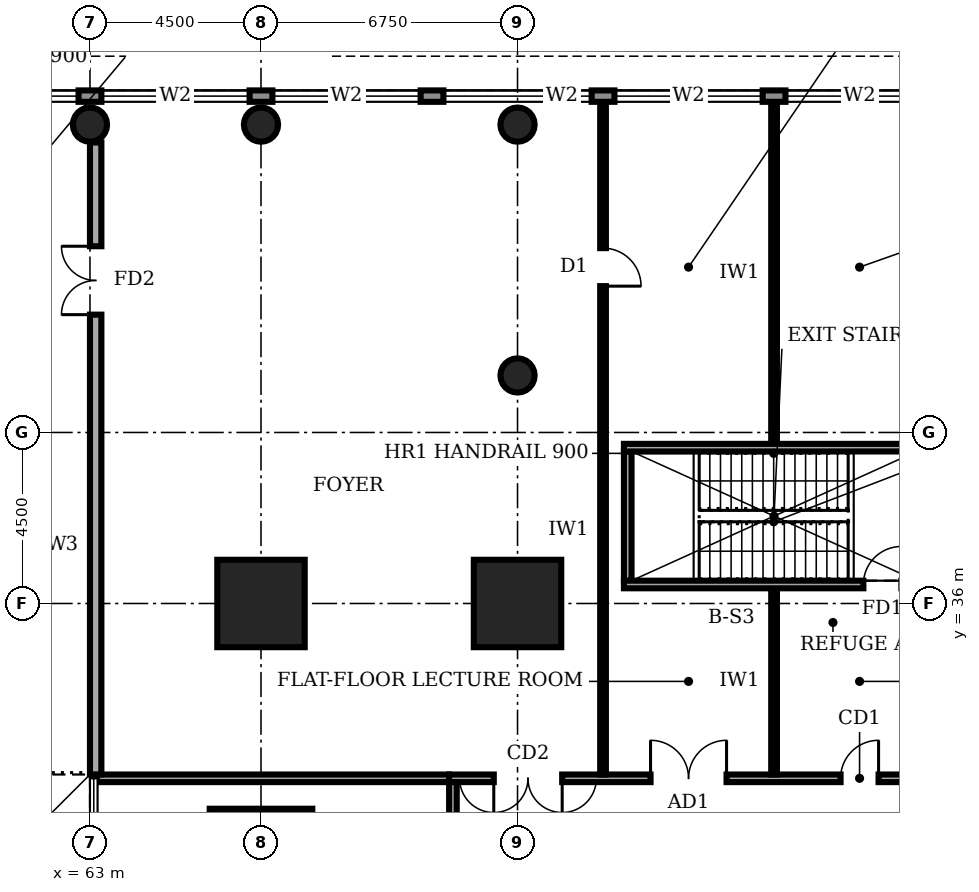
"""IFC4 building model, lengths in metres.
Left out: names, types, materials, properties, quantities, classifications, styles, units other than length and angle.
Written with IfcOpenShell. Run it as: python <this file> out.ifc"""

import sys

from ifc_helpers import new_model, si_unit, direction, frame, frame_2d, origin, origin_2d, place, context, subcontext, project, spatial, rectangle, circle, extrude, element, fill, save


model = new_model("IFC4")
c1 = context("Model", 3, precision=1e-05, world=origin(), true_north=direction((0.0, 1.0)))
c2 = subcontext(c1, "Body", "Model", "MODEL_VIEW")
j1 = project(units=[si_unit("LENGTHUNIT", "METRE"), si_unit("PLANEANGLEUNIT", "RADIAN")], contexts=[c1])
p1 = place(None, origin())
s1 = spatial("IfcSite", under=j1, at=p1, CompositionType="ELEMENT")
p2 = place(p1, origin())
s2 = spatial("IfcBuilding", under=s1, at=p2, CompositionType="ELEMENT")
p3 = place(p2, frame((0.0, 0.0, 6.0)))
s3 = spatial("IfcBuildingStorey", under=s2, at=p3, CompositionType="ELEMENT", Elevation=6.0)
p4 = place(p3, frame((67.5, 29.25, 0.0), z_axis=(0.0, 0.0, 1.0), x_axis=(1.0, 0.0, 0.0)))
e1 = element("IfcColumn", 1, at=p4, inside=s3, PredefinedType="COLUMN", context=c2, shape_type="SweptSolid", body=[
    extrude(rectangle(XDim=2.7, YDim=2.7, at=origin_2d()), origin(), (0.0, 0.0, 1.0), 5.0),
])
for number, where, z_axis, x_axis in (
    (2, (67.5, 36.0, 0.0), (0.0, 0.0, 1.0), (1.0, 0.0, 0.0)),
    (3, (74.25, 36.0, 0.0), (0.0, 0.0, 1.0), (1.0, 0.0, 0.0)),
):
    element("IfcColumn", number, at=place(p3, frame(where, z_axis=z_axis, x_axis=x_axis)), inside=s3, PredefinedType="COLUMN", context=c2, shape_type="SweptSolid", body=[
        extrude(rectangle(XDim=2.3, YDim=2.3, at=origin_2d()), origin(), (0.0, 0.0, 1.0), 5.0),
    ])
for number, where, z_axis, x_axis in (
    (4, (74.25, 42.0, 0.0), (0.0, 0.0, 1.0), (1.0, 0.0, 0.0)),
    (5, (63.0, 48.6, 0.0), (0.0, 0.0, 1.0), (1.0, 0.0, 0.0)),
    (6, (67.5, 48.6, 0.0), (0.0, 0.0, 1.0), (1.0, 0.0, 0.0)),
    (7, (74.25, 48.6, 0.0), (0.0, 0.0, 1.0), (1.0, 0.0, 0.0)),
):
    element("IfcColumn", number, at=place(p3, frame(where, z_axis=z_axis, x_axis=x_axis)), inside=s3, PredefinedType="COLUMN", context=c2, shape_type="SweptSolid", body=[
        extrude(circle(Radius=0.45, at=origin_2d()), origin(), (0.0, 0.0, 1.0), 5.0),
    ])
p5 = place(p3, frame((98.98, 49.35, 0.0), z_axis=(0.0, 0.0, 1.0), x_axis=(-1.0, 0.0, 0.0)))
e8 = element("IfcWall", 8, at=p5, inside=s3, PredefinedType="STANDARD", context=c2, shape_type="SweptSolid", body=[
    extrude(rectangle(XDim=98.96, YDim=0.3, at=frame_2d((49.48, 0.0))), origin(), (0.0, 0.0, 1.0), 4.7),
])
p6 = place(p5, frame((94.78, 0.0, 0.6)))
e9 = element("IfcOpeningElement", 9, at=p6, cuts=e8, PredefinedType="OPENING", context=c2, shape_type="SweptSolid", body=[
    extrude(rectangle(XDim=3.9, YDim=2.6, at=frame_2d((1.95, 1.3))), frame((0.0, 0.16, 0.0), z_axis=(0.0, -1.0, 0.0), x_axis=(1.0, 0.0, 0.0)), (0.0, 0.0, 1.0), 0.32),
])
p7 = place(p5, frame((90.28, 0.0, 0.6)))
e10 = element("IfcOpeningElement", 10, at=p7, cuts=e8, PredefinedType="OPENING", context=c2, shape_type="SweptSolid", body=[
    extrude(rectangle(XDim=3.9, YDim=2.6, at=frame_2d((1.95, 1.3))), frame((0.0, 0.16, 0.0), z_axis=(0.0, -1.0, 0.0), x_axis=(1.0, 0.0, 0.0)), (0.0, 0.0, 1.0), 0.32),
])
p8 = place(p5, frame((85.78, 0.0, 0.6)))
e11 = element("IfcOpeningElement", 11, at=p8, cuts=e8, PredefinedType="OPENING", context=c2, shape_type="SweptSolid", body=[
    extrude(rectangle(XDim=3.9, YDim=2.6, at=frame_2d((1.95, 1.3))), frame((0.0, 0.16, 0.0), z_axis=(0.0, -1.0, 0.0), x_axis=(1.0, 0.0, 0.0)), (0.0, 0.0, 1.0), 0.32),
])
p9 = place(p5, frame((81.28, 0.0, 0.6)))
e12 = element("IfcOpeningElement", 12, at=p9, cuts=e8, PredefinedType="OPENING", context=c2, shape_type="SweptSolid", body=[
    extrude(rectangle(XDim=3.9, YDim=2.6, at=frame_2d((1.95, 1.3))), frame((0.0, 0.16, 0.0), z_axis=(0.0, -1.0, 0.0), x_axis=(1.0, 0.0, 0.0)), (0.0, 0.0, 1.0), 0.32),
])
p10 = place(p5, frame((76.78, 0.0, 0.6)))
e13 = element("IfcOpeningElement", 13, at=p10, cuts=e8, PredefinedType="OPENING", context=c2, shape_type="SweptSolid", body=[
    extrude(rectangle(XDim=3.9, YDim=2.6, at=frame_2d((1.95, 1.3))), frame((0.0, 0.16, 0.0), z_axis=(0.0, -1.0, 0.0), x_axis=(1.0, 0.0, 0.0)), (0.0, 0.0, 1.0), 0.32),
])
p11 = place(p5, frame((72.28, 0.0, 0.6)))
e14 = element("IfcOpeningElement", 14, at=p11, cuts=e8, PredefinedType="OPENING", context=c2, shape_type="SweptSolid", body=[
    extrude(rectangle(XDim=3.9, YDim=2.6, at=frame_2d((1.95, 1.3))), frame((0.0, 0.16, 0.0), z_axis=(0.0, -1.0, 0.0), x_axis=(1.0, 0.0, 0.0)), (0.0, 0.0, 1.0), 0.32),
])
p12 = place(p5, frame((67.78, 0.0, 0.6)))
e15 = element("IfcOpeningElement", 15, at=p12, cuts=e8, PredefinedType="OPENING", context=c2, shape_type="SweptSolid", body=[
    extrude(rectangle(XDim=3.9, YDim=2.6, at=frame_2d((1.95, 1.3))), frame((0.0, 0.16, 0.0), z_axis=(0.0, -1.0, 0.0), x_axis=(1.0, 0.0, 0.0)), (0.0, 0.0, 1.0), 0.32),
])
p13 = place(p5, frame((63.28, 0.0, 0.6)))
e16 = element("IfcOpeningElement", 16, at=p13, cuts=e8, PredefinedType="OPENING", context=c2, shape_type="SweptSolid", body=[
    extrude(rectangle(XDim=3.9, YDim=2.6, at=frame_2d((1.95, 1.3))), frame((0.0, 0.16, 0.0), z_axis=(0.0, -1.0, 0.0), x_axis=(1.0, 0.0, 0.0)), (0.0, 0.0, 1.0), 0.32),
])
p14 = place(p5, frame((58.78, 0.0, 0.6)))
e17 = element("IfcOpeningElement", 17, at=p14, cuts=e8, PredefinedType="OPENING", context=c2, shape_type="SweptSolid", body=[
    extrude(rectangle(XDim=3.9, YDim=2.6, at=frame_2d((1.95, 1.3))), frame((0.0, 0.16, 0.0), z_axis=(0.0, -1.0, 0.0), x_axis=(1.0, 0.0, 0.0)), (0.0, 0.0, 1.0), 0.32),
])
p15 = place(p5, frame((54.28, 0.0, 0.6)))
e18 = element("IfcOpeningElement", 18, at=p15, cuts=e8, PredefinedType="OPENING", context=c2, shape_type="SweptSolid", body=[
    extrude(rectangle(XDim=3.9, YDim=2.6, at=frame_2d((1.95, 1.3))), frame((0.0, 0.16, 0.0), z_axis=(0.0, -1.0, 0.0), x_axis=(1.0, 0.0, 0.0)), (0.0, 0.0, 1.0), 0.32),
])
p16 = place(p5, frame((49.78, 0.0, 0.6)))
e19 = element("IfcOpeningElement", 19, at=p16, cuts=e8, PredefinedType="OPENING", context=c2, shape_type="SweptSolid", body=[
    extrude(rectangle(XDim=3.9, YDim=2.6, at=frame_2d((1.95, 1.3))), frame((0.0, 0.16, 0.0), z_axis=(0.0, -1.0, 0.0), x_axis=(1.0, 0.0, 0.0)), (0.0, 0.0, 1.0), 0.32),
])
p17 = place(p5, frame((45.28, 0.0, 0.6)))
e20 = element("IfcOpeningElement", 20, at=p17, cuts=e8, PredefinedType="OPENING", context=c2, shape_type="SweptSolid", body=[
    extrude(rectangle(XDim=3.9, YDim=2.6, at=frame_2d((1.95, 1.3))), frame((0.0, 0.16, 0.0), z_axis=(0.0, -1.0, 0.0), x_axis=(1.0, 0.0, 0.0)), (0.0, 0.0, 1.0), 0.32),
])
p18 = place(p5, frame((40.78, 0.0, 0.6)))
e21 = element("IfcOpeningElement", 21, at=p18, cuts=e8, PredefinedType="OPENING", context=c2, shape_type="SweptSolid", body=[
    extrude(rectangle(XDim=3.9, YDim=2.6, at=frame_2d((1.95, 1.3))), frame((0.0, 0.16, 0.0), z_axis=(0.0, -1.0, 0.0), x_axis=(1.0, 0.0, 0.0)), (0.0, 0.0, 1.0), 0.32),
])
p19 = place(p5, frame((36.28, 0.0, 0.6)))
e22 = element("IfcOpeningElement", 22, at=p19, cuts=e8, PredefinedType="OPENING", context=c2, shape_type="SweptSolid", body=[
    extrude(rectangle(XDim=3.9, YDim=2.6, at=frame_2d((1.95, 1.3))), frame((0.0, 0.16, 0.0), z_axis=(0.0, -1.0, 0.0), x_axis=(1.0, 0.0, 0.0)), (0.0, 0.0, 1.0), 0.32),
])
p20 = place(p5, frame((31.78, 0.0, 0.6)))
e23 = element("IfcOpeningElement", 23, at=p20, cuts=e8, PredefinedType="OPENING", context=c2, shape_type="SweptSolid", body=[
    extrude(rectangle(XDim=3.9, YDim=2.6, at=frame_2d((1.95, 1.3))), frame((0.0, 0.16, 0.0), z_axis=(0.0, -1.0, 0.0), x_axis=(1.0, 0.0, 0.0)), (0.0, 0.0, 1.0), 0.32),
])
p21 = place(p5, frame((27.28, 0.0, 0.6)))
e24 = element("IfcOpeningElement", 24, at=p21, cuts=e8, PredefinedType="OPENING", context=c2, shape_type="SweptSolid", body=[
    extrude(rectangle(XDim=3.9, YDim=2.6, at=frame_2d((1.95, 1.3))), frame((0.0, 0.16, 0.0), z_axis=(0.0, -1.0, 0.0), x_axis=(1.0, 0.0, 0.0)), (0.0, 0.0, 1.0), 0.32),
])
p22 = place(p5, frame((22.78, 0.0, 0.6)))
e25 = element("IfcOpeningElement", 25, at=p22, cuts=e8, PredefinedType="OPENING", context=c2, shape_type="SweptSolid", body=[
    extrude(rectangle(XDim=3.9, YDim=2.6, at=frame_2d((1.95, 1.3))), frame((0.0, 0.16, 0.0), z_axis=(0.0, -1.0, 0.0), x_axis=(1.0, 0.0, 0.0)), (0.0, 0.0, 1.0), 0.32),
])
p23 = place(p5, frame((18.28, 0.0, 0.6)))
e26 = element("IfcOpeningElement", 26, at=p23, cuts=e8, PredefinedType="OPENING", context=c2, shape_type="SweptSolid", body=[
    extrude(rectangle(XDim=3.9, YDim=2.6, at=frame_2d((1.95, 1.3))), frame((0.0, 0.16, 0.0), z_axis=(0.0, -1.0, 0.0), x_axis=(1.0, 0.0, 0.0)), (0.0, 0.0, 1.0), 0.32),
])
p24 = place(p5, frame((13.78, 0.0, 0.6)))
e27 = element("IfcOpeningElement", 27, at=p24, cuts=e8, PredefinedType="OPENING", context=c2, shape_type="SweptSolid", body=[
    extrude(rectangle(XDim=3.9, YDim=2.6, at=frame_2d((1.95, 1.3))), frame((0.0, 0.16, 0.0), z_axis=(0.0, -1.0, 0.0), x_axis=(1.0, 0.0, 0.0)), (0.0, 0.0, 1.0), 0.32),
])
p25 = place(p5, frame((9.28, 0.0, 0.6)))
e28 = element("IfcOpeningElement", 28, at=p25, cuts=e8, PredefinedType="OPENING", context=c2, shape_type="SweptSolid", body=[
    extrude(rectangle(XDim=3.9, YDim=2.6, at=frame_2d((1.95, 1.3))), frame((0.0, 0.16, 0.0), z_axis=(0.0, -1.0, 0.0), x_axis=(1.0, 0.0, 0.0)), (0.0, 0.0, 1.0), 0.32),
])
p26 = place(p5, frame((4.78, 0.0, 0.6)))
e29 = element("IfcOpeningElement", 29, at=p26, cuts=e8, PredefinedType="OPENING", context=c2, shape_type="SweptSolid", body=[
    extrude(rectangle(XDim=3.9, YDim=2.6, at=frame_2d((1.95, 1.3))), frame((0.0, 0.16, 0.0), z_axis=(0.0, -1.0, 0.0), x_axis=(1.0, 0.0, 0.0)), (0.0, 0.0, 1.0), 0.32),
])
p27 = place(p3, frame((89.35, 31.4, 0.0), z_axis=(0.0, 0.0, 1.0), x_axis=(-1.0, 0.0, 0.0)))
e30 = element("IfcWall", 30, at=p27, inside=s3, PredefinedType="SOLIDWALL", context=c2, shape_type="SweptSolid", body=[
    extrude(rectangle(XDim=16.9, YDim=0.2, at=frame_2d((8.45, 0.0))), origin(), (0.0, 0.0, 1.0), 4.7),
])
p28 = place(p27, frame((13.925, 0.0, 0.0)))
e31 = element("IfcOpeningElement", 31, at=p28, cuts=e30, PredefinedType="OPENING", context=c2, shape_type="SweptSolid", body=[
    extrude(rectangle(XDim=1.8, YDim=2.1, at=frame_2d((0.9, 1.05))), frame((0.0, 0.11, 0.0), z_axis=(0.0, -1.0, 0.0), x_axis=(1.0, 0.0, 0.0)), (0.0, 0.0, 1.0), 0.22),
])
p29 = place(p27, frame((9.6, 0.0, 0.0)))
e32 = element("IfcOpeningElement", 32, at=p29, cuts=e30, PredefinedType="OPENING", context=c2, shape_type="SweptSolid", body=[
    extrude(rectangle(XDim=2.0, YDim=2.4, at=frame_2d((1.0, 1.2))), frame((0.0, 0.11, 0.0), z_axis=(0.0, -1.0, 0.0), x_axis=(1.0, 0.0, 0.0)), (0.0, 0.0, 1.0), 0.22),
])
p30 = place(p27, frame((5.6, 0.0, 0.0)))
e33 = element("IfcOpeningElement", 33, at=p30, cuts=e30, PredefinedType="OPENING", context=c2, shape_type="SweptSolid", body=[
    extrude(rectangle(XDim=1.0, YDim=2.1, at=frame_2d((0.5, 1.05))), frame((0.0, 0.11, 0.0), z_axis=(0.0, -1.0, 0.0), x_axis=(1.0, 0.0, 0.0)), (0.0, 0.0, 1.0), 0.22),
])
p31 = place(p27, frame((0.925, 0.0, 0.0)))
e34 = element("IfcOpeningElement", 34, at=p31, cuts=e30, PredefinedType="OPENING", context=c2, shape_type="SweptSolid", body=[
    extrude(rectangle(XDim=1.8, YDim=2.1, at=frame_2d((0.9, 1.05))), frame((0.0, 0.11, 0.0), z_axis=(0.0, -1.0, 0.0), x_axis=(1.0, 0.0, 0.0)), (0.0, 0.0, 1.0), 0.22),
])
p32 = place(p3, frame((72.55, 31.3, 0.0), z_axis=(0.0, 0.0, 1.0), x_axis=(0.0, -1.0, 0.0)))
e35 = element("IfcWall", 35, at=p32, inside=s3, PredefinedType="SOLIDWALL", context=c2, shape_type="SweptSolid", body=[
    extrude(rectangle(XDim=22.3, YDim=0.2, at=frame_2d((11.15, 0.0))), origin(), (0.0, 0.0, 1.0), 4.7),
])
p33 = place(p32, frame((19.55, 0.0, 0.0)))
e36 = element("IfcOpeningElement", 36, at=p33, cuts=e35, PredefinedType="OPENING", context=c2, shape_type="SweptSolid", body=[
    extrude(rectangle(XDim=1.0, YDim=2.1, at=frame_2d((0.5, 1.05))), frame((0.0, 0.11, 0.0), z_axis=(0.0, -1.0, 0.0), x_axis=(1.0, 0.0, 0.0)), (0.0, 0.0, 1.0), 0.22),
])
p34 = place(p32, frame((12.8, 0.0, 0.0)))
e37 = element("IfcOpeningElement", 37, at=p34, cuts=e35, PredefinedType="OPENING", context=c2, shape_type="SweptSolid", body=[
    extrude(rectangle(XDim=1.0, YDim=2.1, at=frame_2d((0.5, 1.05))), frame((0.0, 0.11, 0.0), z_axis=(0.0, -1.0, 0.0), x_axis=(1.0, 0.0, 0.0)), (0.0, 0.0, 1.0), 0.22),
])
p35 = place(p32, frame((3.8, 0.0, 0.0)))
e38 = element("IfcOpeningElement", 38, at=p35, cuts=e35, PredefinedType="OPENING", context=c2, shape_type="SweptSolid", body=[
    extrude(rectangle(XDim=1.0, YDim=2.1, at=frame_2d((0.5, 1.05))), frame((0.0, 0.11, 0.0), z_axis=(0.0, -1.0, 0.0), x_axis=(1.0, 0.0, 0.0)), (0.0, 0.0, 1.0), 0.22),
])
p36 = place(p3, frame((63.18, 31.4, 0.0), z_axis=(0.0, 0.0, 1.0), x_axis=(1.0, 0.0, 0.0)))
e39 = element("IfcWall", 39, at=p36, inside=s3, PredefinedType="SOLIDWALL", context=c2, shape_type="SweptSolid", body=[
    extrude(rectangle(XDim=9.27, YDim=0.2, at=frame_2d((4.635, 0.0))), origin(), (0.0, 0.0, 1.0), 4.7),
])
p37 = place(p3, frame((76.5, 31.5, 0.0), z_axis=(0.0, 0.0, 1.0), x_axis=(0.0, 1.0, 0.0)))
e40 = element("IfcWall", 40, at=p37, inside=s3, PredefinedType="PARTITIONING", context=c2, shape_type="SweptSolid", body=[
    extrude(rectangle(XDim=17.7, YDim=0.15, at=frame_2d((8.85, 0.0))), origin(), (0.0, 0.0, 1.0), 4.7),
])
p38 = place(p37, frame((12.85, 0.0, 0.0)))
e41 = element("IfcOpeningElement", 41, at=p38, cuts=e40, PredefinedType="OPENING", context=c2, shape_type="SweptSolid", body=[
    extrude(rectangle(XDim=1.0, YDim=2.1, at=frame_2d((0.5, 1.05))), frame((0.0, 0.085, 0.0), z_axis=(0.0, -1.0, 0.0), x_axis=(1.0, 0.0, 0.0)), (0.0, 0.0, 1.0), 0.17),
])
p39 = place(p3, frame((81.0, 31.5, 0.0), z_axis=(0.0, 0.0, 1.0), x_axis=(0.0, 1.0, 0.0)))
e42 = element("IfcWall", 42, at=p39, inside=s3, PredefinedType="PARTITIONING", context=c2, shape_type="SweptSolid", body=[
    extrude(rectangle(XDim=4.9, YDim=0.15, at=frame_2d((2.45, 0.0))), origin(), (0.0, 0.0, 1.0), 4.7),
])
p40 = place(p3, frame((81.0, 40.2, 0.0), z_axis=(0.0, 0.0, 1.0), x_axis=(0.0, 1.0, 0.0)))
e43 = element("IfcWall", 43, at=p40, inside=s3, PredefinedType="PARTITIONING", context=c2, shape_type="SweptSolid", body=[
    extrude(rectangle(XDim=9.0, YDim=0.15, at=frame_2d((4.5, 0.0))), origin(), (0.0, 0.0, 1.0), 4.7),
])
p41 = place(p3, frame((77.05, 36.5, 0.0), z_axis=(0.0, 0.0, 1.0), x_axis=(1.0, 0.0, 0.0)))
e44 = element("IfcWall", 44, at=p41, inside=s3, PredefinedType="SOLIDWALL", context=c2, shape_type="SweptSolid", body=[
    extrude(rectangle(XDim=7.9, YDim=0.2, at=frame_2d((3.95, 0.0))), origin(), (0.0, 0.0, 1.0), 4.7),
])
p42 = place(p41, frame((6.3, 0.0, 0.0)))
e45 = element("IfcOpeningElement", 45, at=p42, cuts=e44, PredefinedType="OPENING", context=c2, shape_type="SweptSolid", body=[
    extrude(rectangle(XDim=1.0, YDim=2.1, at=frame_2d((0.5, 1.05))), frame((0.0, 0.11, 0.0), z_axis=(0.0, -1.0, 0.0), x_axis=(1.0, 0.0, 0.0)), (0.0, 0.0, 1.0), 0.22),
])
p43 = place(p3, frame((77.05, 40.1, 0.0), z_axis=(0.0, 0.0, 1.0), x_axis=(1.0, 0.0, 0.0)))
e46 = element("IfcWall", 46, at=p43, inside=s3, PredefinedType="SOLIDWALL", context=c2, shape_type="SweptSolid", body=[
    extrude(rectangle(XDim=7.9, YDim=0.2, at=frame_2d((3.95, 0.0))), origin(), (0.0, 0.0, 1.0), 4.7),
])
p44 = place(p3, frame((77.15, 36.6, 0.0), z_axis=(0.0, 0.0, 1.0), x_axis=(0.0, 1.0, 0.0)))
e47 = element("IfcWall", 47, at=p44, inside=s3, PredefinedType="SOLIDWALL", context=c2, shape_type="SweptSolid", body=[
    extrude(rectangle(XDim=3.4, YDim=0.2, at=frame_2d((1.7, 0.0))), origin(), (0.0, 0.0, 1.0), 4.7),
])
p45 = place(p3, frame((63.15, 31.5, 0.0), z_axis=(0.0, 0.0, 1.0), x_axis=(0.0, 1.0, 0.0)))
e48 = element("IfcWall", 48, at=p45, inside=s3, PredefinedType="SOLIDWALL", context=c2, shape_type="SweptSolid", body=[
    extrude(rectangle(XDim=16.63, YDim=0.3, at=frame_2d((8.315, 0.0))), origin(), (0.0, 0.0, 1.0), 4.7),
])
p46 = place(p45, frame((12.1, 0.0, 0.0)))
e49 = element("IfcOpeningElement", 49, at=p46, cuts=e48, PredefinedType="OPENING", context=c2, shape_type="SweptSolid", body=[
    extrude(rectangle(XDim=1.8, YDim=2.1, at=frame_2d((0.9, 1.05))), frame((0.0, 0.16, 0.0), z_axis=(0.0, -1.0, 0.0), x_axis=(1.0, 0.0, 0.0)), (0.0, 0.0, 1.0), 0.32),
])
p47 = place(p19, origin())
e50 = element("IfcWindow", 50, at=p47, inside=s3, PartitioningType="SINGLE_PANEL", PredefinedType="WINDOW", context=c2, shape_type="SweptSolid", body=[
    extrude(rectangle(XDim=3.9, YDim=2.6, at=frame_2d((1.95, 1.3))), frame((0.0, 0.03, 0.0), z_axis=(0.0, -1.0, 0.0), x_axis=(1.0, 0.0, 0.0)), (0.0, 0.0, 1.0), 0.06),
])
fill(e22, e50)
p48 = place(p20, origin())
e51 = element("IfcWindow", 51, at=p48, inside=s3, PartitioningType="SINGLE_PANEL", PredefinedType="WINDOW", context=c2, shape_type="SweptSolid", body=[
    extrude(rectangle(XDim=3.9, YDim=2.6, at=frame_2d((1.95, 1.3))), frame((0.0, 0.03, 0.0), z_axis=(0.0, -1.0, 0.0), x_axis=(1.0, 0.0, 0.0)), (0.0, 0.0, 1.0), 0.06),
])
fill(e23, e51)
p49 = place(p21, origin())
e52 = element("IfcWindow", 52, at=p49, inside=s3, PartitioningType="SINGLE_PANEL", PredefinedType="WINDOW", context=c2, shape_type="SweptSolid", body=[
    extrude(rectangle(XDim=3.9, YDim=2.6, at=frame_2d((1.95, 1.3))), frame((0.0, 0.03, 0.0), z_axis=(0.0, -1.0, 0.0), x_axis=(1.0, 0.0, 0.0)), (0.0, 0.0, 1.0), 0.06),
])
fill(e24, e52)
p50 = place(p22, origin())
e53 = element("IfcWindow", 53, at=p50, inside=s3, PartitioningType="SINGLE_PANEL", PredefinedType="WINDOW", context=c2, shape_type="SweptSolid", body=[
    extrude(rectangle(XDim=3.9, YDim=2.6, at=frame_2d((1.95, 1.3))), frame((0.0, 0.03, 0.0), z_axis=(0.0, -1.0, 0.0), x_axis=(1.0, 0.0, 0.0)), (0.0, 0.0, 1.0), 0.06),
])
fill(e25, e53)
p51 = place(p23, origin())
e54 = element("IfcWindow", 54, at=p51, inside=s3, PartitioningType="SINGLE_PANEL", PredefinedType="WINDOW", context=c2, shape_type="SweptSolid", body=[
    extrude(rectangle(XDim=3.9, YDim=2.6, at=frame_2d((1.95, 1.3))), frame((0.0, 0.03, 0.0), z_axis=(0.0, -1.0, 0.0), x_axis=(1.0, 0.0, 0.0)), (0.0, 0.0, 1.0), 0.06),
])
fill(e26, e54)
p52 = place(p24, origin())
e55 = element("IfcWindow", 55, at=p52, inside=s3, PartitioningType="SINGLE_PANEL", PredefinedType="WINDOW", context=c2, shape_type="SweptSolid", body=[
    extrude(rectangle(XDim=3.9, YDim=2.6, at=frame_2d((1.95, 1.3))), frame((0.0, 0.03, 0.0), z_axis=(0.0, -1.0, 0.0), x_axis=(1.0, 0.0, 0.0)), (0.0, 0.0, 1.0), 0.06),
])
fill(e27, e55)
p53 = place(p28, origin())
e56 = element("IfcDoor", 56, at=p53, inside=s3, OperationType="DOUBLE_DOOR_SINGLE_SWING", PredefinedType="DOOR", context=c2, shape_type="SweptSolid", body=[
    extrude(rectangle(XDim=1.8, YDim=2.1, at=frame_2d((0.9, 1.05))), frame((0.0, 0.025, 0.0), z_axis=(0.0, -1.0, 0.0), x_axis=(1.0, 0.0, 0.0)), (0.0, 0.0, 1.0), 0.05),
])
fill(e31, e56)
p54 = place(p29, frame((2.0, 0.0, 0.0), z_axis=(0.0, 0.0, 1.0), x_axis=(-1.0, 0.0, 0.0)))
e57 = element("IfcDoor", 57, at=p54, inside=s3, OperationType="DOUBLE_DOOR_SINGLE_SWING", PredefinedType="DOOR", context=c2, shape_type="SweptSolid", body=[
    extrude(rectangle(XDim=2.0, YDim=2.4, at=frame_2d((1.0, 1.2))), frame((0.0, 0.025, 0.0), z_axis=(0.0, -1.0, 0.0), x_axis=(1.0, 0.0, 0.0)), (0.0, 0.0, 1.0), 0.05),
])
fill(e32, e57)
p55 = place(p30, frame((1.0, 0.0, 0.0), z_axis=(0.0, 0.0, 1.0), x_axis=(-1.0, 0.0, 0.0)))
e58 = element("IfcDoor", 58, at=p55, inside=s3, OperationType="SINGLE_SWING_RIGHT", PredefinedType="DOOR", context=c2, shape_type="SweptSolid", body=[
    extrude(rectangle(XDim=1.0, YDim=2.1, at=frame_2d((0.5, 1.05))), frame((0.0, 0.025, 0.0), z_axis=(0.0, -1.0, 0.0), x_axis=(1.0, 0.0, 0.0)), (0.0, 0.0, 1.0), 0.05),
])
fill(e33, e58)
p56 = place(p38, frame((1.0, 0.0, 0.0), z_axis=(0.0, 0.0, 1.0), x_axis=(-1.0, 0.0, 0.0)))
e59 = element("IfcDoor", 59, at=p56, inside=s3, OperationType="SINGLE_SWING_RIGHT", PredefinedType="DOOR", context=c2, shape_type="SweptSolid", body=[
    extrude(rectangle(XDim=1.0, YDim=2.1, at=frame_2d((0.5, 1.05))), frame((0.0, 0.025, 0.0), z_axis=(0.0, -1.0, 0.0), x_axis=(1.0, 0.0, 0.0)), (0.0, 0.0, 1.0), 0.05),
])
fill(e41, e59)
p57 = place(p42, origin())
e60 = element("IfcDoor", 60, at=p57, inside=s3, OperationType="SINGLE_SWING_RIGHT", PredefinedType="DOOR", context=c2, shape_type="SweptSolid", body=[
    extrude(rectangle(XDim=1.0, YDim=2.1, at=frame_2d((0.5, 1.05))), frame((0.0, 0.025, 0.0), z_axis=(0.0, -1.0, 0.0), x_axis=(1.0, 0.0, 0.0)), (0.0, 0.0, 1.0), 0.05),
])
fill(e45, e60)
p58 = place(p46, origin())
e61 = element("IfcDoor", 61, at=p58, inside=s3, OperationType="DOUBLE_DOOR_SINGLE_SWING", PredefinedType="DOOR", context=c2, shape_type="SweptSolid", body=[
    extrude(rectangle(XDim=1.8, YDim=2.1, at=frame_2d((0.9, 1.05))), frame((0.0, 0.025, 0.0), z_axis=(0.0, -1.0, 0.0), x_axis=(1.0, 0.0, 0.0)), (0.0, 0.0, 1.0), 0.05),
])
fill(e49, e61)
save(model, sys.argv[1])
